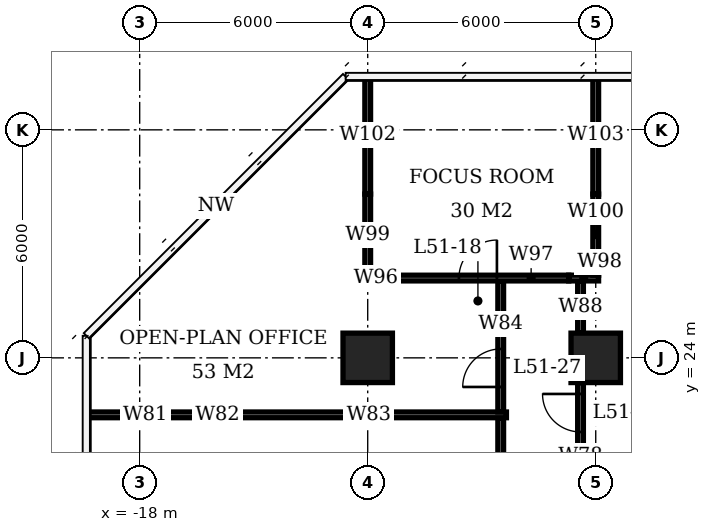
"""IFC4 building model, lengths in metres.
Left out: names, types, materials, properties, quantities, classifications, styles, units other than length and angle.
Written with IfcOpenShell. Run it as: python <this file> out.ifc"""

import sys

from ifc_helpers import new_model, si_unit, direction, frame, frame_2d, origin, origin_2d, place, context, subcontext, project, spatial, rectangle, extrude, element, fill, save


model = new_model("IFC4")
c1 = context("Model", 3, precision=1e-05, world=origin(), true_north=direction((0.0, 1.0)))
c2 = subcontext(c1, "Body", "Model", "MODEL_VIEW")
j1 = project(units=[si_unit("LENGTHUNIT", "METRE"), si_unit("PLANEANGLEUNIT", "RADIAN")], contexts=[c1])
p1 = place(None, origin())
s1 = spatial("IfcSite", under=j1, at=p1, CompositionType="ELEMENT")
p2 = place(p1, origin())
s2 = spatial("IfcBuilding", under=s1, at=p2, CompositionType="ELEMENT")
p3 = place(p2, frame((0.0, 0.0, 208.4)))
s3 = spatial("IfcBuildingStorey", under=s2, at=p3, CompositionType="ELEMENT", Elevation=208.4)
for number, where, z_axis, x_axis in (
    (1, (-12.0, 24.0, 0.0), (0.0, 0.0, 1.0), (1.0, 0.0, 0.0)),
    (2, (-6.0, 24.0, 0.0), (0.0, 0.0, 1.0), (1.0, 0.0, 0.0)),
):
    element("IfcColumn", number, at=place(p3, frame(where, z_axis=z_axis, x_axis=x_axis)), inside=s3, PredefinedType="COLUMN", context=c2, shape_type="SweptSolid", body=[
        extrude(rectangle(XDim=1.3, YDim=1.3, at=origin_2d()), origin(), (0.0, 0.0, 1.0), 3.9),
    ])
p4 = place(p3, frame((-12.075, 26.1, 0.0), z_axis=(0.0, 0.0, 1.0), x_axis=(1.0, 0.0, 0.0)))
e3 = element("IfcWall", 3, at=p4, inside=s3, PredefinedType="PARTITIONING", context=c2, shape_type="SweptSolid", body=[
    extrude(rectangle(XDim=0.585, YDim=0.15, at=frame_2d((0.292, 0.0))), origin(), (0.0, 0.0, 1.0), 2.65),
])
p5 = place(p3, frame((-11.49, 26.1, 0.0), z_axis=(0.0, 0.0, 1.0), x_axis=(1.0, 0.0, 0.0)))
e4 = element("IfcWall", 4, at=p5, inside=s3, PredefinedType="PARTITIONING", context=c2, shape_type="SweptSolid", body=[
    extrude(rectangle(XDim=4.78, YDim=0.15, at=frame_2d((2.39, 0.0))), origin(), (0.0, 0.0, 1.0), 3.65),
])
p6 = place(p5, frame((1.89, 0.0, 0.0)))
e5 = element("IfcOpeningElement", 5, at=p6, cuts=e4, PredefinedType="OPENING", context=c2, shape_type="SweptSolid", body=[
    extrude(rectangle(XDim=1.0, YDim=2.1, at=frame_2d((0.5, 1.05))), frame((0.0, 0.085, 0.0), z_axis=(0.0, -1.0, 0.0), x_axis=(1.0, 0.0, 0.0)), (0.0, 0.0, 1.0), 0.17),
])
p7 = place(p3, frame((-6.71, 26.1, 0.0), z_axis=(0.0, 0.0, 1.0), x_axis=(1.0, 0.0, 0.0)))
e6 = element("IfcWall", 6, at=p7, inside=s3, PredefinedType="PARTITIONING", context=c2, shape_type="SweptSolid", body=[
    extrude(rectangle(XDim=0.785, YDim=0.15, at=frame_2d((0.393, 0.0))), origin(), (0.0, 0.0, 1.0), 2.65),
])
p8 = place(p3, frame((-12.0, 26.175, 0.0), z_axis=(0.0, 0.0, 1.0), x_axis=(0.0, 1.0, 0.0)))
e7 = element("IfcWall", 7, at=p8, inside=s3, PredefinedType="PARTITIONING", context=c2, shape_type="SweptSolid", body=[
    extrude(rectangle(XDim=2.135, YDim=0.15, at=frame_2d((1.067, 0.0))), origin(), (0.0, 0.0, 1.0), 2.65),
])
p9 = place(p3, frame((-12.0, 28.31, 0.0), z_axis=(0.0, 0.0, 1.0), x_axis=(0.0, 1.0, 0.0)))
e8 = element("IfcWall", 8, at=p9, inside=s3, PredefinedType="PARTITIONING", context=c2, shape_type="SweptSolid", body=[
    extrude(rectangle(XDim=3.09, YDim=0.15, at=frame_2d((1.545, 0.0))), origin(), (0.0, 0.0, 1.0), 3.65),
])
p10 = place(p3, frame((-6.0, 26.175, 0.0), z_axis=(0.0, 0.0, 1.0), x_axis=(0.0, 1.0, 0.0)))
e9 = element("IfcWall", 9, at=p10, inside=s3, PredefinedType="PARTITIONING", context=c2, shape_type="SweptSolid", body=[
    extrude(rectangle(XDim=2.135, YDim=0.15, at=frame_2d((1.067, 0.0))), origin(), (0.0, 0.0, 1.0), 2.65),
])
for number, where, z_axis, x_axis in (
    (10, (-6.0, 28.31, 0.0), (0.0, 0.0, 1.0), (0.0, 1.0, 0.0)),
    (11, (-19.4, 22.5, 0.0), (0.0, 0.0, 1.0), (1.0, 0.0, 0.0)),
):
    element("IfcWall", number, at=place(p3, frame(where, z_axis=z_axis, x_axis=x_axis)), inside=s3, PredefinedType="PARTITIONING", context=c2, shape_type="SweptSolid", body=[
        extrude(rectangle(XDim=3.09, YDim=0.15, at=frame_2d((1.545, 0.0))), origin(), (0.0, 0.0, 1.0), 3.65),
    ])
p11 = place(p3, frame((-16.31, 22.5, 0.0), z_axis=(0.0, 0.0, 1.0), x_axis=(1.0, 0.0, 0.0)))
e12 = element("IfcWall", 12, at=p11, inside=s3, PredefinedType="PARTITIONING", context=c2, shape_type="SweptSolid", body=[
    extrude(rectangle(XDim=0.72, YDim=0.15, at=frame_2d((0.36, 0.0))), origin(), (0.0, 0.0, 1.0), 2.65),
])
p12 = place(p3, frame((-15.59, 22.5, 0.0), z_axis=(0.0, 0.0, 1.0), x_axis=(1.0, 0.0, 0.0)))
e13 = element("IfcWall", 13, at=p12, inside=s3, PredefinedType="PARTITIONING", context=c2, shape_type="SweptSolid", body=[
    extrude(rectangle(XDim=7.24, YDim=0.15, at=frame_2d((3.62, 0.0))), origin(), (0.0, 0.0, 1.0), 3.65),
])
p13 = place(p3, frame((-8.5, 10.575, 0.0), z_axis=(0.0, 0.0, 1.0), x_axis=(0.0, 1.0, 0.0)))
e14 = element("IfcWall", 14, at=p13, inside=s3, PredefinedType="PARTITIONING", context=c2, shape_type="SweptSolid", body=[
    extrude(rectangle(XDim=11.85, YDim=0.15, at=frame_2d((5.925, 0.0))), origin(), (0.0, 0.0, 1.0), 3.65),
])
p14 = place(p13, frame((7.225, 0.0, 0.0)))
e15 = element("IfcOpeningElement", 15, at=p14, cuts=e14, PredefinedType="OPENING", context=c2, shape_type="SweptSolid", body=[
    extrude(rectangle(XDim=1.0, YDim=2.1, at=frame_2d((0.5, 1.05))), frame((0.0, 0.085, 0.0), z_axis=(0.0, -1.0, 0.0), x_axis=(1.0, 0.0, 0.0)), (0.0, 0.0, 1.0), 0.17),
])
p15 = place(p3, frame((-8.5, 22.575, 0.0), z_axis=(0.0, 0.0, 1.0), x_axis=(0.0, 1.0, 0.0)))
e16 = element("IfcWall", 16, at=p15, inside=s3, PredefinedType="PARTITIONING", context=c2, shape_type="SweptSolid", body=[
    extrude(rectangle(XDim=3.45, YDim=0.15, at=frame_2d((1.725, 0.0))), origin(), (0.0, 0.0, 1.0), 3.65),
])
p16 = place(p15, frame((0.659, 0.0, 0.0)))
e17 = element("IfcOpeningElement", 17, at=p16, cuts=e16, PredefinedType="OPENING", context=c2, shape_type="SweptSolid", body=[
    extrude(rectangle(XDim=1.0, YDim=2.1, at=frame_2d((0.5, 1.05))), frame((0.0, 0.085, 0.0), z_axis=(0.0, -1.0, 0.0), x_axis=(1.0, 0.0, 0.0)), (0.0, 0.0, 1.0), 0.17),
])
p17 = place(p3, frame((-6.4, 19.5, 0.0), z_axis=(0.0, 0.0, 1.0), x_axis=(0.0, 1.0, 0.0)))
e18 = element("IfcWall", 18, at=p17, inside=s3, PredefinedType="PARTITIONING", context=c2, shape_type="SweptSolid", body=[
    extrude(rectangle(XDim=3.85, YDim=0.15, at=frame_2d((1.925, 0.0))), origin(), (0.0, 0.0, 1.0), 3.65),
])
p18 = place(p17, frame((2.55, 0.0, 0.0)))
e19 = element("IfcOpeningElement", 19, at=p18, cuts=e18, PredefinedType="OPENING", context=c2, shape_type="SweptSolid", body=[
    extrude(rectangle(XDim=1.0, YDim=2.1, at=frame_2d((0.5, 1.05))), frame((0.0, 0.085, 0.0), z_axis=(0.0, -1.0, 0.0), x_axis=(1.0, 0.0, 0.0)), (0.0, 0.0, 1.0), 0.17),
])
p19 = place(p3, frame((-6.4, 24.65, 0.0), z_axis=(0.0, 0.0, 1.0), x_axis=(0.0, 1.0, 0.0)))
e20 = element("IfcWall", 20, at=p19, inside=s3, PredefinedType="PARTITIONING", context=c2, shape_type="SweptSolid", body=[
    extrude(rectangle(XDim=1.375, YDim=0.15, at=frame_2d((0.688, 0.0))), origin(), (0.0, 0.0, 1.0), 2.65),
])
p20 = place(p6, origin())
e21 = element("IfcDoor", 21, at=p20, inside=s3, OperationType="SINGLE_SWING_RIGHT", PredefinedType="DOOR", context=c2, shape_type="SweptSolid", body=[
    extrude(rectangle(XDim=1.0, YDim=2.1, at=frame_2d((0.5, 1.05))), frame((0.0, 0.025, 0.0), z_axis=(0.0, -1.0, 0.0), x_axis=(1.0, 0.0, 0.0)), (0.0, 0.0, 1.0), 0.05),
])
fill(e5, e21)
p21 = place(p18, origin())
e22 = element("IfcDoor", 22, at=p21, inside=s3, OperationType="SINGLE_SWING_RIGHT", PredefinedType="DOOR", context=c2, shape_type="SweptSolid", body=[
    extrude(rectangle(XDim=1.0, YDim=2.1, at=frame_2d((0.5, 1.05))), frame((0.0, 0.025, 0.0), z_axis=(0.0, -1.0, 0.0), x_axis=(1.0, 0.0, 0.0)), (0.0, 0.0, 1.0), 0.05),
])
fill(e19, e22)
p22 = place(p16, origin())
e23 = element("IfcDoor", 23, at=p22, inside=s3, OperationType="SINGLE_SWING_LEFT", PredefinedType="DOOR", context=c2, shape_type="SweptSolid", body=[
    extrude(rectangle(XDim=1.0, YDim=2.1, at=frame_2d((0.5, 1.05))), frame((0.0, 0.025, 0.0), z_axis=(0.0, -1.0, 0.0), x_axis=(1.0, 0.0, 0.0)), (0.0, 0.0, 1.0), 0.05),
])
fill(e17, e23)
save(model, sys.argv[1])
